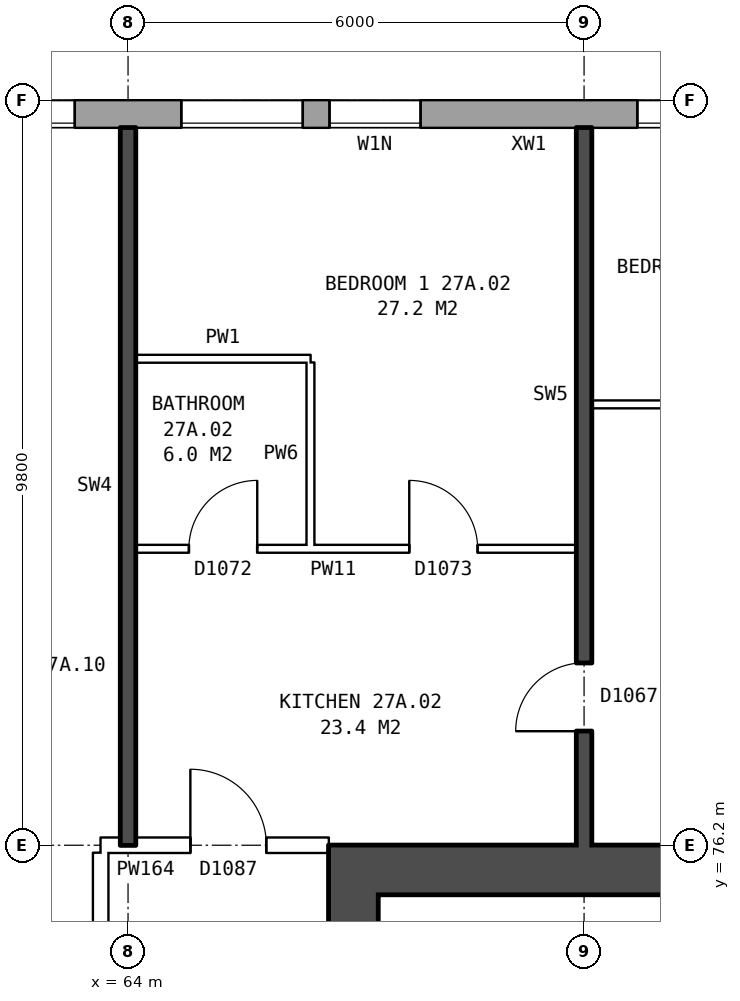
"""IFC4 building model, lengths in metres.
Left out: names, types, materials, properties, quantities, classifications, styles, units other than length and angle.
Written with IfcOpenShell. Run it as: python <this file> out.ifc"""

import sys

from ifc_helpers import new_model, si_unit, direction, frame, frame_2d, origin, place, context, subcontext, project, spatial, rectangle, extrude, element, fill, save


model = new_model("IFC4")
c1 = context("Model", 3, precision=1e-05, world=origin(), true_north=direction((0.0, 1.0)))
c2 = subcontext(c1, "Body", "Model", "MODEL_VIEW")
j1 = project(units=[si_unit("LENGTHUNIT", "METRE"), si_unit("PLANEANGLEUNIT", "RADIAN")], contexts=[c1])
p1 = place(None, origin())
s1 = spatial("IfcSite", under=j1, at=p1, CompositionType="ELEMENT")
p2 = place(p1, origin())
s2 = spatial("IfcBuilding", under=s1, at=p2, CompositionType="ELEMENT")
p3 = place(p2, frame((0.0, 0.0, 99.5)))
s3 = spatial("IfcBuildingStorey", under=s2, at=p3, CompositionType="ELEMENT", Elevation=99.5)
p4 = place(p3, frame((72.925, 85.82, 0.0), z_axis=(0.0, 0.0, 1.0), x_axis=(-1.0, 0.0, 0.0)))
e1 = element("IfcWall", 1, at=p4, inside=s3, PredefinedType="STANDARD", context=c2, shape_type="SweptSolid", body=[
    extrude(rectangle(XDim=44.851, YDim=0.36, at=frame_2d((22.425, 0.0))), origin(), (0.0, 0.0, 1.0), 2.85),
])
p5 = place(p4, frame((0.625, 0.0, 0.8)))
e2 = element("IfcOpeningElement", 2, at=p5, cuts=e1, PredefinedType="OPENING", context=c2, shape_type="SweptSolid", body=[
    extrude(rectangle(XDim=1.6, YDim=1.8, at=frame_2d((0.8, 0.9))), frame((0.0, 0.19, 0.0), z_axis=(0.0, -1.0, 0.0), x_axis=(1.0, 0.0, 0.0)), (0.0, 0.0, 1.0), 0.38),
])
p6 = place(p4, frame((5.075, 0.0, 0.8)))
e3 = element("IfcOpeningElement", 3, at=p6, cuts=e1, PredefinedType="OPENING", context=c2, shape_type="SweptSolid", body=[
    extrude(rectangle(XDim=1.2, YDim=1.2, at=frame_2d((0.6, 0.6))), frame((0.0, 0.19, 0.0), z_axis=(0.0, -1.0, 0.0), x_axis=(1.0, 0.0, 0.0)), (0.0, 0.0, 1.0), 0.38),
])
p7 = place(p4, frame((6.625, 0.0, 0.8)))
e4 = element("IfcOpeningElement", 4, at=p7, cuts=e1, PredefinedType="OPENING", context=c2, shape_type="SweptSolid", body=[
    extrude(rectangle(XDim=1.6, YDim=1.8, at=frame_2d((0.8, 0.9))), frame((0.0, 0.19, 0.0), z_axis=(0.0, -1.0, 0.0), x_axis=(1.0, 0.0, 0.0)), (0.0, 0.0, 1.0), 0.38),
])
p8 = place(p4, frame((9.625, 0.0, 0.8)))
e5 = element("IfcOpeningElement", 5, at=p8, cuts=e1, PredefinedType="OPENING", context=c2, shape_type="SweptSolid", body=[
    extrude(rectangle(XDim=1.6, YDim=1.8, at=frame_2d((0.8, 0.9))), frame((0.0, 0.19, 0.0), z_axis=(0.0, -1.0, 0.0), x_axis=(1.0, 0.0, 0.0)), (0.0, 0.0, 1.0), 0.38),
])
p9 = place(p4, frame((12.625, 0.0, 0.8)))
e6 = element("IfcOpeningElement", 6, at=p9, cuts=e1, PredefinedType="OPENING", context=c2, shape_type="SweptSolid", body=[
    extrude(rectangle(XDim=1.6, YDim=1.8, at=frame_2d((0.8, 0.9))), frame((0.0, 0.19, 0.0), z_axis=(0.0, -1.0, 0.0), x_axis=(1.0, 0.0, 0.0)), (0.0, 0.0, 1.0), 0.38),
])
p10 = place(p4, frame((15.625, 0.0, 0.8)))
e7 = element("IfcOpeningElement", 7, at=p10, cuts=e1, PredefinedType="OPENING", context=c2, shape_type="SweptSolid", body=[
    extrude(rectangle(XDim=1.6, YDim=1.8, at=frame_2d((0.8, 0.9))), frame((0.0, 0.19, 0.0), z_axis=(0.0, -1.0, 0.0), x_axis=(1.0, 0.0, 0.0)), (0.0, 0.0, 1.0), 0.38),
])
p11 = place(p4, frame((18.625, 0.0, 0.8)))
e8 = element("IfcOpeningElement", 8, at=p11, cuts=e1, PredefinedType="OPENING", context=c2, shape_type="SweptSolid", body=[
    extrude(rectangle(XDim=1.6, YDim=1.8, at=frame_2d((0.8, 0.9))), frame((0.0, 0.19, 0.0), z_axis=(0.0, -1.0, 0.0), x_axis=(1.0, 0.0, 0.0)), (0.0, 0.0, 1.0), 0.38),
])
p12 = place(p4, frame((21.625, 0.0, 0.8)))
e9 = element("IfcOpeningElement", 9, at=p12, cuts=e1, PredefinedType="OPENING", context=c2, shape_type="SweptSolid", body=[
    extrude(rectangle(XDim=1.6, YDim=1.8, at=frame_2d((0.8, 0.9))), frame((0.0, 0.19, 0.0), z_axis=(0.0, -1.0, 0.0), x_axis=(1.0, 0.0, 0.0)), (0.0, 0.0, 1.0), 0.38),
])
p13 = place(p4, frame((24.625, 0.0, 0.8)))
e10 = element("IfcOpeningElement", 10, at=p13, cuts=e1, PredefinedType="OPENING", context=c2, shape_type="SweptSolid", body=[
    extrude(rectangle(XDim=1.6, YDim=1.8, at=frame_2d((0.8, 0.9))), frame((0.0, 0.19, 0.0), z_axis=(0.0, -1.0, 0.0), x_axis=(1.0, 0.0, 0.0)), (0.0, 0.0, 1.0), 0.38),
])
p14 = place(p4, frame((27.625, 0.0, 0.8)))
e11 = element("IfcOpeningElement", 11, at=p14, cuts=e1, PredefinedType="OPENING", context=c2, shape_type="SweptSolid", body=[
    extrude(rectangle(XDim=1.6, YDim=1.8, at=frame_2d((0.8, 0.9))), frame((0.0, 0.19, 0.0), z_axis=(0.0, -1.0, 0.0), x_axis=(1.0, 0.0, 0.0)), (0.0, 0.0, 1.0), 0.38),
])
p15 = place(p4, frame((30.625, 0.0, 0.8)))
e12 = element("IfcOpeningElement", 12, at=p15, cuts=e1, PredefinedType="OPENING", context=c2, shape_type="SweptSolid", body=[
    extrude(rectangle(XDim=1.6, YDim=1.8, at=frame_2d((0.8, 0.9))), frame((0.0, 0.19, 0.0), z_axis=(0.0, -1.0, 0.0), x_axis=(1.0, 0.0, 0.0)), (0.0, 0.0, 1.0), 0.38),
])
p16 = place(p4, frame((33.625, 0.0, 0.8)))
e13 = element("IfcOpeningElement", 13, at=p16, cuts=e1, PredefinedType="OPENING", context=c2, shape_type="SweptSolid", body=[
    extrude(rectangle(XDim=1.6, YDim=1.8, at=frame_2d((0.8, 0.9))), frame((0.0, 0.19, 0.0), z_axis=(0.0, -1.0, 0.0), x_axis=(1.0, 0.0, 0.0)), (0.0, 0.0, 1.0), 0.38),
])
p17 = place(p4, frame((36.625, 0.0, 0.8)))
e14 = element("IfcOpeningElement", 14, at=p17, cuts=e1, PredefinedType="OPENING", context=c2, shape_type="SweptSolid", body=[
    extrude(rectangle(XDim=1.6, YDim=1.8, at=frame_2d((0.8, 0.9))), frame((0.0, 0.19, 0.0), z_axis=(0.0, -1.0, 0.0), x_axis=(1.0, 0.0, 0.0)), (0.0, 0.0, 1.0), 0.38),
])
p18 = place(p4, frame((39.125, 0.0, 0.8)))
e15 = element("IfcOpeningElement", 15, at=p18, cuts=e1, PredefinedType="OPENING", context=c2, shape_type="SweptSolid", body=[
    extrude(rectangle(XDim=1.0, YDim=0.9, at=frame_2d((0.5, 0.45))), frame((0.0, 0.19, 0.0), z_axis=(0.0, -1.0, 0.0), x_axis=(1.0, 0.0, 0.0)), (0.0, 0.0, 1.0), 0.38),
])
p19 = place(p4, frame((42.625, 0.0, 0.8)))
e16 = element("IfcOpeningElement", 16, at=p19, cuts=e1, PredefinedType="OPENING", context=c2, shape_type="SweptSolid", body=[
    extrude(rectangle(XDim=1.6, YDim=1.8, at=frame_2d((0.8, 0.9))), frame((0.0, 0.19, 0.0), z_axis=(0.0, -1.0, 0.0), x_axis=(1.0, 0.0, 0.0)), (0.0, 0.0, 1.0), 0.38),
])
p20 = place(p4, frame((41.425, 0.0, 1.7)))
e17 = element("IfcOpeningElement", 17, at=p20, cuts=e1, PredefinedType="OPENING", context=c2, shape_type="SweptSolid", body=[
    extrude(rectangle(XDim=0.8, YDim=0.9, at=frame_2d((0.4, 0.45))), frame((0.0, 0.19, 0.0), z_axis=(0.0, -1.0, 0.0), x_axis=(1.0, 0.0, 0.0)), (0.0, 0.0, 1.0), 0.38),
])
p21 = place(p3, frame((66.965, 64.45, 0.0), z_axis=(0.0, 0.0, 1.0), x_axis=(0.0, 1.0, 0.0)))
e18 = element("IfcWall", 18, at=p21, inside=s3, PredefinedType="SHEAR", context=c2, shape_type="SweptSolid", body=[
    extrude(rectangle(XDim=11.1, YDim=0.65, at=frame_2d((5.55, 0.0))), origin(), (0.0, 0.0, 1.0), 2.85),
])
p22 = place(p21, frame((0.675, 0.0, 0.0)))
e19 = element("IfcOpeningElement", 19, at=p22, cuts=e18, PredefinedType="OPENING", context=c2, shape_type="SweptSolid", body=[
    extrude(rectangle(XDim=1.1, YDim=2.1, at=frame_2d((0.55, 1.05))), frame((0.0, 0.335, 0.0), z_axis=(0.0, -1.0, 0.0), x_axis=(1.0, 0.0, 0.0)), (0.0, 0.0, 1.0), 0.67),
])
p23 = place(p21, frame((9.25, 0.0, 0.0)))
e20 = element("IfcOpeningElement", 20, at=p23, cuts=e18, PredefinedType="OPENING", context=c2, shape_type="SweptSolid", body=[
    extrude(rectangle(XDim=1.1, YDim=2.1, at=frame_2d((0.55, 1.05))), frame((0.0, 0.335, 0.0), z_axis=(0.0, -1.0, 0.0), x_axis=(1.0, 0.0, 0.0)), (0.0, 0.0, 1.0), 0.67),
])
p24 = place(p3, frame((66.64, 75.875, 0.0), z_axis=(0.0, 0.0, 1.0), x_axis=(1.0, 0.0, 0.0)))
e21 = element("IfcWall", 21, at=p24, inside=s3, PredefinedType="SHEAR", context=c2, shape_type="SweptSolid", body=[
    extrude(rectangle(XDim=9.0, YDim=0.65, at=frame_2d((4.5, 0.0))), origin(), (0.0, 0.0, 1.0), 2.85),
])
p25 = place(p3, frame((63.64, 63.9, 0.0), z_axis=(0.0, 0.0, 1.0), x_axis=(0.0, 1.0, 0.0)))
e22 = element("IfcWall", 22, at=p25, inside=s3, PredefinedType="PARTITIONING", context=c2, shape_type="SweptSolid", body=[
    extrude(rectangle(XDim=12.2, YDim=0.2, at=frame_2d((6.1, 0.0))), origin(), (0.0, 0.0, 1.0), 2.85),
])
p26 = place(p25, frame((5.1, 0.0, 0.0)))
e23 = element("IfcOpeningElement", 23, at=p26, cuts=e22, PredefinedType="OPENING", context=c2, shape_type="SweptSolid", body=[
    extrude(rectangle(XDim=2.0, YDim=2.1, at=frame_2d((1.0, 1.05))), frame((0.0, 0.11, 0.0), z_axis=(0.0, -1.0, 0.0), x_axis=(1.0, 0.0, 0.0)), (0.0, 0.0, 1.0), 0.22),
])
p27 = place(p3, frame((63.64, 76.2, 0.0), z_axis=(0.0, 0.0, 1.0), x_axis=(1.0, 0.0, 0.0)))
e24 = element("IfcWall", 24, at=p27, inside=s3, PredefinedType="PARTITIONING", context=c2, shape_type="SweptSolid", body=[
    extrude(rectangle(XDim=3.0, YDim=0.2, at=frame_2d((1.5, 0.0))), origin(), (0.0, 0.0, 1.0), 2.85),
])
p28 = place(p27, frame((1.18, 0.0, 0.0)))
e25 = element("IfcOpeningElement", 25, at=p28, cuts=e24, PredefinedType="OPENING", context=c2, shape_type="SweptSolid", body=[
    extrude(rectangle(XDim=1.0, YDim=2.1, at=frame_2d((0.5, 1.05))), frame((0.0, 0.11, 0.0), z_axis=(0.0, -1.0, 0.0), x_axis=(1.0, 0.0, 0.0)), (0.0, 0.0, 1.0), 0.22),
])
p29 = place(p3, frame((64.1, 80.1, 0.0), z_axis=(0.0, 0.0, 1.0), x_axis=(1.0, 0.0, 0.0)))
e26 = element("IfcWall", 26, at=p29, inside=s3, PredefinedType="PARTITIONING", context=c2, shape_type="SweptSolid", body=[
    extrude(rectangle(XDim=5.8, YDim=0.1, at=frame_2d((2.9, 0.0))), origin(), (0.0, 0.0, 1.0), 2.85),
])
p30 = place(p29, frame((3.6, 0.0, 0.0)))
e27 = element("IfcOpeningElement", 27, at=p30, cuts=e26, PredefinedType="OPENING", context=c2, shape_type="SweptSolid", body=[
    extrude(rectangle(XDim=0.9, YDim=2.1, at=frame_2d((0.45, 1.05))), frame((0.0, 0.06, 0.0), z_axis=(0.0, -1.0, 0.0), x_axis=(1.0, 0.0, 0.0)), (0.0, 0.0, 1.0), 0.12),
])
p31 = place(p29, frame((0.7, 0.0, 0.0)))
e28 = element("IfcOpeningElement", 28, at=p31, cuts=e26, PredefinedType="OPENING", context=c2, shape_type="SweptSolid", body=[
    extrude(rectangle(XDim=0.9, YDim=2.1, at=frame_2d((0.45, 1.05))), frame((0.0, 0.06, 0.0), z_axis=(0.0, -1.0, 0.0), x_axis=(1.0, 0.0, 0.0)), (0.0, 0.0, 1.0), 0.12),
])
p32 = place(p3, frame((70.1, 82.0, 0.0), z_axis=(0.0, 0.0, 1.0), x_axis=(1.0, 0.0, 0.0)))
e29 = element("IfcWall", 29, at=p32, inside=s3, PredefinedType="PARTITIONING", context=c2, shape_type="SweptSolid", body=[
    extrude(rectangle(XDim=5.54, YDim=0.1, at=frame_2d((2.77, 0.0))), origin(), (0.0, 0.0, 1.0), 2.85),
])
p33 = place(p32, frame((2.32, 0.0, 0.0)))
e30 = element("IfcOpeningElement", 30, at=p33, cuts=e29, PredefinedType="OPENING", context=c2, shape_type="SweptSolid", body=[
    extrude(rectangle(XDim=0.9, YDim=2.1, at=frame_2d((0.45, 1.05))), frame((0.0, 0.06, 0.0), z_axis=(0.0, -1.0, 0.0), x_axis=(1.0, 0.0, 0.0)), (0.0, 0.0, 1.0), 0.12),
])
p34 = place(p3, frame((64.1, 82.6, 0.0), z_axis=(0.0, 0.0, 1.0), x_axis=(1.0, 0.0, 0.0)))
e31 = element("IfcWall", 31, at=p34, inside=s3, PredefinedType="PARTITIONING", context=c2, shape_type="SweptSolid", body=[
    extrude(rectangle(XDim=2.3, YDim=0.1, at=frame_2d((1.15, 0.0))), origin(), (0.0, 0.0, 1.0), 2.85),
])
p35 = place(p3, frame((64.0, 76.2, 0.0), z_axis=(0.0, 0.0, 1.0), x_axis=(0.0, 1.0, 0.0)))
e32 = element("IfcWall", 32, at=p35, inside=s3, PredefinedType="SOLIDWALL", context=c2, shape_type="SweptSolid", body=[
    extrude(rectangle(XDim=9.44, YDim=0.2, at=frame_2d((4.72, 0.0))), origin(), (0.0, 0.0, 1.0), 2.85),
])
p36 = place(p3, frame((66.4, 80.15, 0.0), z_axis=(0.0, 0.0, 1.0), x_axis=(0.0, 1.0, 0.0)))
e33 = element("IfcWall", 33, at=p36, inside=s3, PredefinedType="PARTITIONING", context=c2, shape_type="SweptSolid", body=[
    extrude(rectangle(XDim=2.4, YDim=0.1, at=frame_2d((1.2, 0.0))), origin(), (0.0, 0.0, 1.0), 2.85),
])
p37 = place(p3, frame((70.0, 76.2, 0.0), z_axis=(0.0, 0.0, 1.0), x_axis=(0.0, 1.0, 0.0)))
e34 = element("IfcWall", 34, at=p37, inside=s3, PredefinedType="SOLIDWALL", context=c2, shape_type="SweptSolid", body=[
    extrude(rectangle(XDim=9.44, YDim=0.2, at=frame_2d((4.72, 0.0))), origin(), (0.0, 0.0, 1.0), 2.85),
])
p38 = place(p37, frame((1.5, 0.0, 0.0)))
e35 = element("IfcOpeningElement", 35, at=p38, cuts=e34, PredefinedType="OPENING", context=c2, shape_type="SweptSolid", body=[
    extrude(rectangle(XDim=0.9, YDim=2.1, at=frame_2d((0.45, 1.05))), frame((0.0, 0.11, 0.0), z_axis=(0.0, -1.0, 0.0), x_axis=(1.0, 0.0, 0.0)), (0.0, 0.0, 1.0), 0.22),
])
p39 = place(p5, origin())
e36 = element("IfcWindow", 36, at=p39, inside=s3, PartitioningType="SINGLE_PANEL", PredefinedType="WINDOW", context=c2, shape_type="SweptSolid", body=[
    extrude(rectangle(XDim=1.6, YDim=1.8, at=frame_2d((0.8, 0.9))), frame((0.0, 0.15, 0.0), z_axis=(0.0, -1.0, 0.0), x_axis=(1.0, 0.0, 0.0)), (0.0, 0.0, 1.0), 0.06),
])
fill(e2, e36)
p40 = place(p6, origin())
e37 = element("IfcWindow", 37, at=p40, inside=s3, PartitioningType="SINGLE_PANEL", PredefinedType="WINDOW", context=c2, shape_type="SweptSolid", body=[
    extrude(rectangle(XDim=1.2, YDim=1.2, at=frame_2d((0.6, 0.6))), frame((0.0, 0.15, 0.0), z_axis=(0.0, -1.0, 0.0), x_axis=(1.0, 0.0, 0.0)), (0.0, 0.0, 1.0), 0.06),
])
fill(e3, e37)
p41 = place(p7, origin())
e38 = element("IfcWindow", 38, at=p41, inside=s3, PartitioningType="SINGLE_PANEL", PredefinedType="WINDOW", context=c2, shape_type="SweptSolid", body=[
    extrude(rectangle(XDim=1.6, YDim=1.8, at=frame_2d((0.8, 0.9))), frame((0.0, 0.15, 0.0), z_axis=(0.0, -1.0, 0.0), x_axis=(1.0, 0.0, 0.0)), (0.0, 0.0, 1.0), 0.06),
])
fill(e4, e38)
p42 = place(p8, origin())
e39 = element("IfcWindow", 39, at=p42, inside=s3, PartitioningType="SINGLE_PANEL", PredefinedType="WINDOW", context=c2, shape_type="SweptSolid", body=[
    extrude(rectangle(XDim=1.6, YDim=1.8, at=frame_2d((0.8, 0.9))), frame((0.0, 0.15, 0.0), z_axis=(0.0, -1.0, 0.0), x_axis=(1.0, 0.0, 0.0)), (0.0, 0.0, 1.0), 0.06),
])
fill(e5, e39)
p43 = place(p30, origin())
e40 = element("IfcDoor", 40, at=p43, inside=s3, OperationType="SINGLE_SWING_LEFT", PredefinedType="DOOR", context=c2, shape_type="SweptSolid", body=[
    extrude(rectangle(XDim=0.9, YDim=2.1, at=frame_2d((0.45, 1.05))), frame((0.0, 0.025, 0.0), z_axis=(0.0, -1.0, 0.0), x_axis=(1.0, 0.0, 0.0)), (0.0, 0.0, 1.0), 0.05),
])
fill(e27, e40)
p44 = place(p28, origin())
e41 = element("IfcDoor", 41, at=p44, inside=s3, OperationType="SINGLE_SWING_LEFT", PredefinedType="DOOR", context=c2, shape_type="SweptSolid", body=[
    extrude(rectangle(XDim=1.0, YDim=2.1, at=frame_2d((0.5, 1.05))), frame((0.0, 0.025, 0.0), z_axis=(0.0, -1.0, 0.0), x_axis=(1.0, 0.0, 0.0)), (0.0, 0.0, 1.0), 0.05),
])
fill(e25, e41)
p45 = place(p38, origin())
e42 = element("IfcDoor", 42, at=p45, inside=s3, OperationType="SINGLE_SWING_LEFT", PredefinedType="DOOR", context=c2, shape_type="SweptSolid", body=[
    extrude(rectangle(XDim=0.9, YDim=2.1, at=frame_2d((0.45, 1.05))), frame((0.0, 0.025, 0.0), z_axis=(0.0, -1.0, 0.0), x_axis=(1.0, 0.0, 0.0)), (0.0, 0.0, 1.0), 0.05),
])
fill(e35, e42)
p46 = place(p31, origin())
e43 = element("IfcDoor", 43, at=p46, inside=s3, OperationType="SINGLE_SWING_RIGHT", PredefinedType="DOOR", context=c2, shape_type="SweptSolid", body=[
    extrude(rectangle(XDim=0.9, YDim=2.1, at=frame_2d((0.45, 1.05))), frame((0.0, 0.025, 0.0), z_axis=(0.0, -1.0, 0.0), x_axis=(1.0, 0.0, 0.0)), (0.0, 0.0, 1.0), 0.05),
])
fill(e28, e43)
save(model, sys.argv[1])
